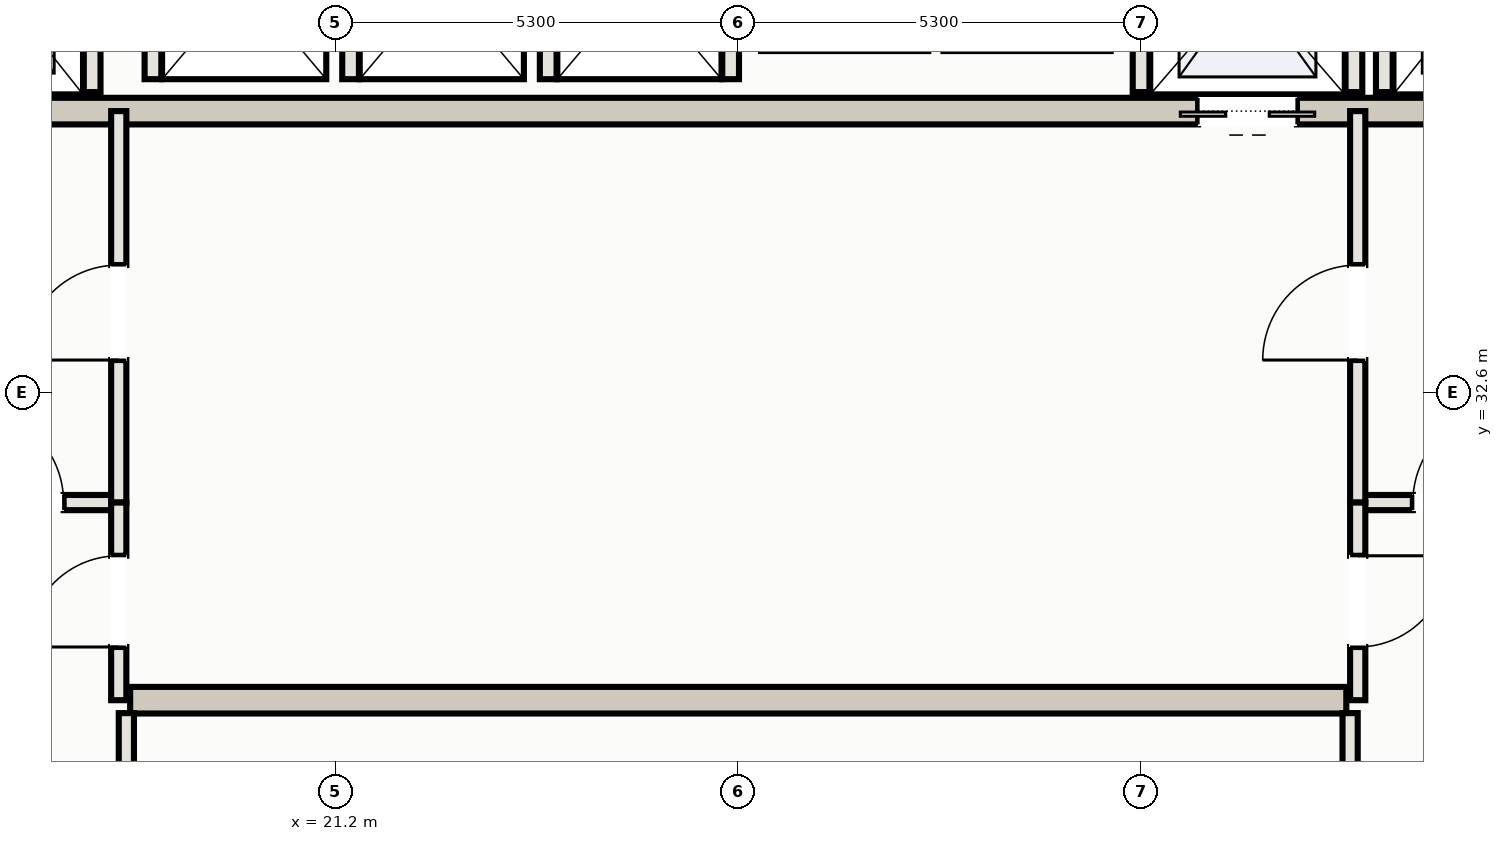
"""IFC4 building model, lengths in metres.
Left out: names, types, materials, properties, quantities, classifications, styles, units other than length and angle.
Written with IfcOpenShell. Run it as: python <this file> out.ifc"""

import sys

from ifc_helpers import new_model, si_unit, direction, frame, frame_2d, origin, place, context, subcontext, project, spatial, rectangle, extrude, element, fill, save


model = new_model("IFC4")
c1 = context("Model", 3, precision=1e-05, world=origin(), true_north=direction((0.0, 1.0)))
c2 = subcontext(c1, "Body", "Model", "MODEL_VIEW")
j1 = project(units=[si_unit("LENGTHUNIT", "METRE"), si_unit("PLANEANGLEUNIT", "RADIAN")], contexts=[c1])
p1 = place(None, origin())
s1 = spatial("IfcSite", under=j1, at=p1, CompositionType="ELEMENT")
p2 = place(p1, origin())
s2 = spatial("IfcBuilding", under=s1, at=p2, CompositionType="ELEMENT")
p3 = place(p2, frame((0.0, 0.0, 270.8)))
s3 = spatial("IfcBuildingStorey", under=s2, at=p3, CompositionType="ELEMENT", Elevation=270.8)
p4 = place(p3, frame((15.5, 36.3, 0.0), z_axis=(0.0, 0.0, 1.0), x_axis=(1.0, 0.0, 0.0)))
e1 = element("IfcWall", 1, at=p4, inside=s3, PredefinedType="SHEAR", context=c2, shape_type="SweptSolid", body=[
    extrude(rectangle(XDim=22.0, YDim=0.35, at=frame_2d((11.0, 0.0))), origin(), (0.0, 0.0, 1.0), 7.461),
])
p5 = place(p4, frame((0.65, 0.0, 0.0)))
e2 = element("IfcOpeningElement", 2, at=p5, cuts=e1, PredefinedType="OPENING", context=c2, shape_type="SweptSolid", body=[
    extrude(rectangle(XDim=1.1, YDim=2.15, at=frame_2d((0.55, 1.075))), frame((0.0, 0.185, 0.0), z_axis=(0.0, -1.0, 0.0), x_axis=(1.0, 0.0, 0.0)), (0.0, 0.0, 1.0), 0.37),
])
p6 = place(p4, frame((20.25, 0.0, 0.0)))
e3 = element("IfcOpeningElement", 3, at=p6, cuts=e1, PredefinedType="OPENING", context=c2, shape_type="SweptSolid", body=[
    extrude(rectangle(XDim=1.1, YDim=2.15, at=frame_2d((0.55, 1.075))), frame((0.0, 0.185, 0.0), z_axis=(0.0, -1.0, 0.0), x_axis=(1.0, 0.0, 0.0)), (0.0, 0.0, 1.0), 0.37),
])
p7 = place(p4, frame((17.05, 0.0, 0.0)))
e4 = element("IfcOpeningElement", 4, at=p7, cuts=e1, PredefinedType="OPENING", context=c2, shape_type="SweptSolid", body=[
    extrude(rectangle(XDim=1.3, YDim=2.2, at=frame_2d((0.65, 1.1))), frame((0.0, 0.185, 0.0), z_axis=(0.0, -1.0, 0.0), x_axis=(1.0, 0.0, 0.0)), (0.0, 0.0, 1.0), 0.37),
])
p8 = place(p3, frame((18.5, 28.55, 0.0), z_axis=(0.0, 0.0, 1.0), x_axis=(1.0, 0.0, 0.0)))
e5 = element("IfcWall", 5, at=p8, inside=s3, PredefinedType="SHEAR", context=c2, shape_type="SweptSolid", body=[
    extrude(rectangle(XDim=16.0, YDim=0.35, at=frame_2d((8.0, 0.0))), origin(), (0.0, 0.0, 1.0), 8.209),
])
p9 = place(p3, frame((18.0, 36.55, 0.0), z_axis=(0.0, 0.0, 1.0), x_axis=(0.0, 1.0, 0.0)))
e6 = element("IfcWall", 6, at=p9, inside=s3, PredefinedType="SOLIDWALL", context=c2, shape_type="SweptSolid", body=[
    extrude(rectangle(XDim=2.93, YDim=0.22, at=frame_2d((1.465, 0.0))), origin(), (0.0, 0.0, 1.0), 7.375),
])
p10 = place(p3, frame((35.0, 36.55, 0.0), z_axis=(0.0, 0.0, 1.0), x_axis=(0.0, 1.0, 0.0)))
e7 = element("IfcWall", 7, at=p10, inside=s3, PredefinedType="SOLIDWALL", context=c2, shape_type="SweptSolid", body=[
    extrude(rectangle(XDim=2.93, YDim=0.22, at=frame_2d((1.465, 0.0))), origin(), (0.0, 0.0, 1.0), 12.262),
])
for number, where, z_axis, x_axis in (
    (8, (31.8, 36.55, 0.0), (0.0, 0.0, 1.0), (0.0, 1.0, 0.0)),
    (9, (34.6, 36.55, 0.0), (0.0, 0.0, 1.0), (0.0, 1.0, 0.0)),
):
    element("IfcWall", number, at=place(p3, frame(where, z_axis=z_axis, x_axis=x_axis)), inside=s3, PredefinedType="SOLIDWALL", context=c2, shape_type="SweptSolid", body=[
        extrude(rectangle(XDim=2.93, YDim=0.22, at=frame_2d((1.465, 0.0))), origin(), (0.0, 0.0, 1.0), 11.464),
    ])
p11 = place(p3, frame((18.8, 36.72, 0.0), z_axis=(0.0, 0.0, 1.0), x_axis=(0.0, 1.0, 0.0)))
e10 = element("IfcWall", 10, at=p11, inside=s3, PredefinedType="SOLIDWALL", context=c2, shape_type="SweptSolid", body=[
    extrude(rectangle(XDim=2.56, YDim=0.22, at=frame_2d((1.28, 0.0))), origin(), (0.0, 0.0, 1.0), 8.223),
])
p12 = place(p3, frame((21.4, 36.72, 0.0), z_axis=(0.0, 0.0, 1.0), x_axis=(0.0, 1.0, 0.0)))
e11 = element("IfcWall", 11, at=p12, inside=s3, PredefinedType="SOLIDWALL", context=c2, shape_type="SweptSolid", body=[
    extrude(rectangle(XDim=2.56, YDim=0.22, at=frame_2d((1.28, 0.0))), origin(), (0.0, 0.0, 1.0), 8.871),
])
for number, where, z_axis, x_axis in (
    (12, (24.0, 36.72, 0.0), (0.0, 0.0, 1.0), (0.0, 1.0, 0.0)),
    (13, (26.4, 36.72, 0.0), (0.0, 0.0, 1.0), (0.0, 1.0, 0.0)),
):
    element("IfcWall", number, at=place(p3, frame(where, z_axis=z_axis, x_axis=x_axis)), inside=s3, PredefinedType="SOLIDWALL", context=c2, shape_type="SweptSolid", body=[
        extrude(rectangle(XDim=2.56, YDim=0.22, at=frame_2d((1.28, 0.0))), origin(), (0.0, 0.0, 1.0), 9.52),
    ])
p13 = place(p3, frame((15.1, 31.15, 0.0), z_axis=(0.0, 0.0, 1.0), x_axis=(1.0, 0.0, 0.0)))
e14 = element("IfcWall", 14, at=p13, inside=s3, PredefinedType="PARTITIONING", context=c2, shape_type="SweptSolid", body=[
    extrude(rectangle(XDim=3.25, YDim=0.2, at=frame_2d((1.625, 0.0))), origin(), (0.0, 0.0, 1.0), 5.98),
])
p14 = place(p13, frame((1.275, 0.0, 0.0)))
e15 = element("IfcOpeningElement", 15, at=p14, cuts=e14, PredefinedType="OPENING", context=c2, shape_type="SweptSolid", body=[
    extrude(rectangle(XDim=1.25, YDim=2.2, at=frame_2d((0.625, 1.1))), frame((0.0, 0.11, 0.0), z_axis=(0.0, -1.0, 0.0), x_axis=(1.0, 0.0, 0.0)), (0.0, 0.0, 1.0), 0.22),
])
p15 = place(p3, frame((18.35, 31.15, 0.0), z_axis=(0.0, 0.0, 1.0), x_axis=(0.0, 1.0, 0.0)))
e16 = element("IfcWall", 16, at=p15, inside=s3, PredefinedType="PARTITIONING", context=c2, shape_type="SweptSolid", body=[
    extrude(rectangle(XDim=5.15, YDim=0.2, at=frame_2d((2.575, 0.0))), origin(), (0.0, 0.0, 1.0), 5.98),
])
p16 = place(p15, frame((1.875, 0.0, 0.0)))
e17 = element("IfcOpeningElement", 17, at=p16, cuts=e16, PredefinedType="OPENING", context=c2, shape_type="SweptSolid", body=[
    extrude(rectangle(XDim=1.25, YDim=2.2, at=frame_2d((0.625, 1.1))), frame((0.0, 0.11, 0.0), z_axis=(0.0, -1.0, 0.0), x_axis=(1.0, 0.0, 0.0)), (0.0, 0.0, 1.0), 0.22),
])
p17 = place(p3, frame((34.65, 31.15, 0.0), z_axis=(0.0, 0.0, 1.0), x_axis=(1.0, 0.0, 0.0)))
e18 = element("IfcWall", 18, at=p17, inside=s3, PredefinedType="PARTITIONING", context=c2, shape_type="SweptSolid", body=[
    extrude(rectangle(XDim=3.25, YDim=0.2, at=frame_2d((1.625, 0.0))), origin(), (0.0, 0.0, 1.0), 5.98),
])
p18 = place(p17, frame((0.725, 0.0, 0.0)))
e19 = element("IfcOpeningElement", 19, at=p18, cuts=e18, PredefinedType="OPENING", context=c2, shape_type="SweptSolid", body=[
    extrude(rectangle(XDim=1.25, YDim=2.2, at=frame_2d((0.625, 1.1))), frame((0.0, 0.11, 0.0), z_axis=(0.0, -1.0, 0.0), x_axis=(1.0, 0.0, 0.0)), (0.0, 0.0, 1.0), 0.22),
])
p19 = place(p3, frame((34.65, 31.15, 0.0), z_axis=(0.0, 0.0, 1.0), x_axis=(0.0, 1.0, 0.0)))
e20 = element("IfcWall", 20, at=p19, inside=s3, PredefinedType="PARTITIONING", context=c2, shape_type="SweptSolid", body=[
    extrude(rectangle(XDim=5.15, YDim=0.2, at=frame_2d((2.575, 0.0))), origin(), (0.0, 0.0, 1.0), 5.98),
])
p20 = place(p19, frame((1.875, 0.0, 0.0)))
e21 = element("IfcOpeningElement", 21, at=p20, cuts=e20, PredefinedType="OPENING", context=c2, shape_type="SweptSolid", body=[
    extrude(rectangle(XDim=1.25, YDim=2.2, at=frame_2d((0.625, 1.1))), frame((0.0, 0.11, 0.0), z_axis=(0.0, -1.0, 0.0), x_axis=(1.0, 0.0, 0.0)), (0.0, 0.0, 1.0), 0.22),
])
p21 = place(p3, frame((18.35, 28.55, 0.0), z_axis=(0.0, 0.0, 1.0), x_axis=(0.0, 1.0, 0.0)))
e22 = element("IfcWall", 22, at=p21, inside=s3, PredefinedType="PARTITIONING", context=c2, shape_type="SweptSolid", body=[
    extrude(rectangle(XDim=2.6, YDim=0.2, at=frame_2d((1.3, 0.0))), origin(), (0.0, 0.0, 1.0), 5.98),
])
p22 = place(p21, frame((0.7, 0.0, 0.0)))
e23 = element("IfcOpeningElement", 23, at=p22, cuts=e22, PredefinedType="OPENING", context=c2, shape_type="SweptSolid", body=[
    extrude(rectangle(XDim=1.2, YDim=2.2, at=frame_2d((0.6, 1.1))), frame((0.0, 0.11, 0.0), z_axis=(0.0, -1.0, 0.0), x_axis=(1.0, 0.0, 0.0)), (0.0, 0.0, 1.0), 0.22),
])
p23 = place(p3, frame((34.65, 28.55, 0.0), z_axis=(0.0, 0.0, 1.0), x_axis=(0.0, 1.0, 0.0)))
e24 = element("IfcWall", 24, at=p23, inside=s3, PredefinedType="PARTITIONING", context=c2, shape_type="SweptSolid", body=[
    extrude(rectangle(XDim=2.6, YDim=0.2, at=frame_2d((1.3, 0.0))), origin(), (0.0, 0.0, 1.0), 5.98),
])
p24 = place(p23, frame((0.7, 0.0, 0.0)))
e25 = element("IfcOpeningElement", 25, at=p24, cuts=e24, PredefinedType="OPENING", context=c2, shape_type="SweptSolid", body=[
    extrude(rectangle(XDim=1.2, YDim=2.2, at=frame_2d((0.6, 1.1))), frame((0.0, 0.11, 0.0), z_axis=(0.0, -1.0, 0.0), x_axis=(1.0, 0.0, 0.0)), (0.0, 0.0, 1.0), 0.22),
])
for number, where, z_axis, x_axis in (
    (26, (18.45, 25.35, 0.0), (0.0, 0.0, 1.0), (0.0, 1.0, 0.0)),
    (27, (34.55, 25.35, 0.0), (0.0, 0.0, 1.0), (0.0, 1.0, 0.0)),
):
    element("IfcWall", number, at=place(p3, frame(where, z_axis=z_axis, x_axis=x_axis)), inside=s3, PredefinedType="PARTITIONING", context=c2, shape_type="SweptSolid", body=[
        extrude(rectangle(XDim=3.03, YDim=0.2, at=frame_2d((1.515, 0.0))), origin(), (0.0, 0.0, 1.0), 3.6),
    ])
p25 = place(p7, frame((1.3, 0.0, 0.0), z_axis=(0.0, 0.0, 1.0), x_axis=(-1.0, 0.0, 0.0)))
e28 = element("IfcDoor", 28, at=p25, inside=s3, OperationType="DOUBLE_DOOR_SLIDING", PredefinedType="DOOR", context=c2, shape_type="SweptSolid", body=[
    extrude(rectangle(XDim=1.3, YDim=2.2, at=frame_2d((0.65, 1.1))), frame((0.0, 0.025, 0.0), z_axis=(0.0, -1.0, 0.0), x_axis=(1.0, 0.0, 0.0)), (0.0, 0.0, 1.0), 0.05),
])
fill(e4, e28)
p26 = place(p14, origin())
e29 = element("IfcDoor", 29, at=p26, inside=s3, OperationType="SINGLE_SWING_LEFT", PredefinedType="DOOR", context=c2, shape_type="SweptSolid", body=[
    extrude(rectangle(XDim=1.25, YDim=2.2, at=frame_2d((0.625, 1.1))), frame((0.0, 0.025, 0.0), z_axis=(0.0, -1.0, 0.0), x_axis=(1.0, 0.0, 0.0)), (0.0, 0.0, 1.0), 0.05),
])
fill(e15, e29)
p27 = place(p16, origin())
e30 = element("IfcDoor", 30, at=p27, inside=s3, OperationType="SINGLE_SWING_LEFT", PredefinedType="DOOR", context=c2, shape_type="SweptSolid", body=[
    extrude(rectangle(XDim=1.25, YDim=2.2, at=frame_2d((0.625, 1.1))), frame((0.0, 0.025, 0.0), z_axis=(0.0, -1.0, 0.0), x_axis=(1.0, 0.0, 0.0)), (0.0, 0.0, 1.0), 0.05),
])
fill(e17, e30)
p28 = place(p18, origin())
e31 = element("IfcDoor", 31, at=p28, inside=s3, OperationType="SINGLE_SWING_RIGHT", PredefinedType="DOOR", context=c2, shape_type="SweptSolid", body=[
    extrude(rectangle(XDim=1.25, YDim=2.2, at=frame_2d((0.625, 1.1))), frame((0.0, 0.025, 0.0), z_axis=(0.0, -1.0, 0.0), x_axis=(1.0, 0.0, 0.0)), (0.0, 0.0, 1.0), 0.05),
])
fill(e19, e31)
p29 = place(p20, origin())
e32 = element("IfcDoor", 32, at=p29, inside=s3, OperationType="SINGLE_SWING_LEFT", PredefinedType="DOOR", context=c2, shape_type="SweptSolid", body=[
    extrude(rectangle(XDim=1.25, YDim=2.2, at=frame_2d((0.625, 1.1))), frame((0.0, 0.025, 0.0), z_axis=(0.0, -1.0, 0.0), x_axis=(1.0, 0.0, 0.0)), (0.0, 0.0, 1.0), 0.05),
])
fill(e21, e32)
p30 = place(p22, origin())
e33 = element("IfcDoor", 33, at=p30, inside=s3, OperationType="SINGLE_SWING_LEFT", PredefinedType="DOOR", context=c2, shape_type="SweptSolid", body=[
    extrude(rectangle(XDim=1.2, YDim=2.2, at=frame_2d((0.6, 1.1))), frame((0.0, 0.025, 0.0), z_axis=(0.0, -1.0, 0.0), x_axis=(1.0, 0.0, 0.0)), (0.0, 0.0, 1.0), 0.05),
])
fill(e23, e33)
p31 = place(p24, frame((1.2, 0.0, 0.0), z_axis=(0.0, 0.0, 1.0), x_axis=(-1.0, 0.0, 0.0)))
e34 = element("IfcDoor", 34, at=p31, inside=s3, OperationType="SINGLE_SWING_LEFT", PredefinedType="DOOR", context=c2, shape_type="SweptSolid", body=[
    extrude(rectangle(XDim=1.2, YDim=2.2, at=frame_2d((0.6, 1.1))), frame((0.0, 0.025, 0.0), z_axis=(0.0, -1.0, 0.0), x_axis=(1.0, 0.0, 0.0)), (0.0, 0.0, 1.0), 0.05),
])
fill(e25, e34)
save(model, sys.argv[1])
